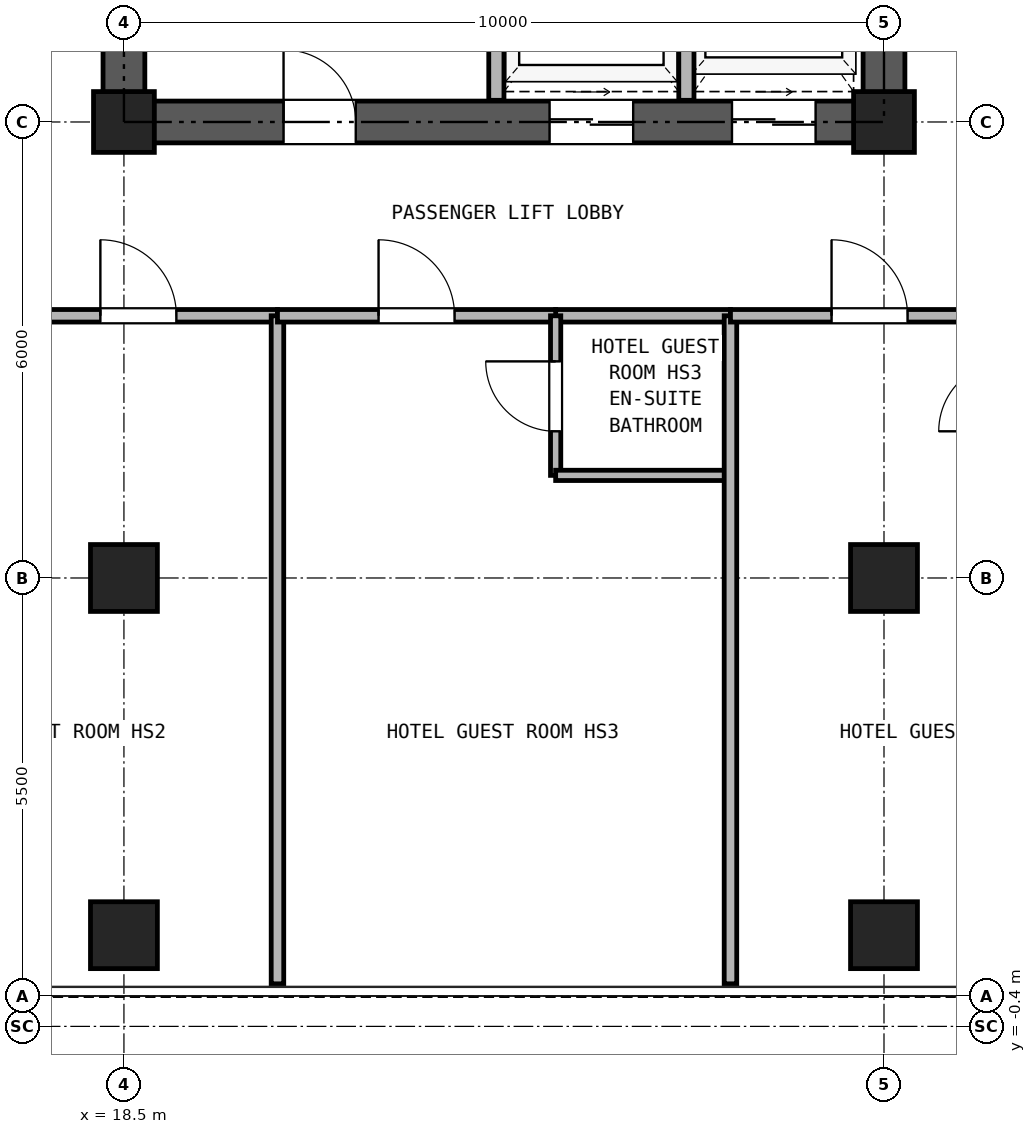
"""IFC4 building model, lengths in metres.
Left out: names, types, materials, properties, quantities, classifications, styles, units other than length and angle.
Written with IfcOpenShell. Run it as: python <this file> out.ifc"""

import sys

from ifc_helpers import new_model, si_unit, direction, frame, frame_2d, origin, origin_2d, place, context, subcontext, project, spatial, rectangle, hollow_rectangle, extrude, source, transform, mapped, element, fill, save


model = new_model("IFC4")
c1 = context("Model", 3, precision=1e-05, world=origin(), true_north=direction((0.0, 1.0)))
c2 = subcontext(c1, "Body", "Model", "MODEL_VIEW")
j1 = project(units=[si_unit("LENGTHUNIT", "METRE"), si_unit("PLANEANGLEUNIT", "RADIAN")], contexts=[c1])
p1 = place(None, origin())
s1 = spatial("IfcSite", under=j1, at=p1, CompositionType="ELEMENT")
p2 = place(p1, origin())
s2 = spatial("IfcBuilding", under=s1, at=p2, CompositionType="ELEMENT")
p3 = place(p2, frame((0.0, 0.0, 111.9)))
s3 = spatial("IfcBuildingStorey", under=s2, at=p3, CompositionType="ELEMENT", Elevation=111.9)
m1 = source(origin(), c2, "Body", "SweptSolid", [
    extrude(hollow_rectangle(XDim=0.88, YDim=0.88, WallThickness=0.05, at=origin_2d()), origin(), (0.0, 0.0, 1.0), 2.95),
])
for number, where, z_axis, x_axis in (
    (1, (18.5, 0.8, 0.0), (0.0, 0.0, 1.0), (1.0, 0.0, 0.0)),
    (2, (28.5, 0.8, 0.0), (0.0, 0.0, 1.0), (1.0, 0.0, 0.0)),
    (3, (18.5, 5.5, 0.0), (0.0, 0.0, 1.0), (1.0, 0.0, 0.0)),
):
    element("IfcColumn", number, at=place(p3, frame(where, z_axis=z_axis, x_axis=x_axis)), inside=s3, PredefinedType="COLUMN", context=c2, shape_type="MappedRepresentation", body=[
        mapped(m1, transform((0.0, 0.0, 0.0), x_axis=(1.0, 0.0, 0.0), y_axis=(0.0, 1.0, 0.0), z_axis=(0.0, 0.0, 1.0), scale=1.0)),
    ])
m2 = source(origin(), c2, "Body", "SweptSolid", [
    extrude(hollow_rectangle(XDim=0.8, YDim=0.8, WallThickness=0.045, at=origin_2d()), origin(), (0.0, 0.0, 1.0), 2.95),
])
p4 = place(p3, frame((18.5, 11.5, 0.0), z_axis=(0.0, 0.0, 1.0), x_axis=(1.0, 0.0, 0.0)))
e4 = element("IfcColumn", 4, at=p4, inside=s3, PredefinedType="COLUMN", context=c2, shape_type="MappedRepresentation", body=[
    mapped(m2, transform((0.0, 0.0, 0.0), x_axis=(1.0, 0.0, 0.0), y_axis=(0.0, 1.0, 0.0), z_axis=(0.0, 0.0, 1.0), scale=1.0)),
])
p5 = place(p3, frame((28.5, 5.5, 0.0), z_axis=(0.0, 0.0, 1.0), x_axis=(1.0, 0.0, 0.0)))
e5 = element("IfcColumn", 5, at=p5, inside=s3, PredefinedType="COLUMN", context=c2, shape_type="MappedRepresentation", body=[
    mapped(m1, transform((0.0, 0.0, 0.0), x_axis=(1.0, 0.0, 0.0), y_axis=(0.0, 1.0, 0.0), z_axis=(0.0, 0.0, 1.0), scale=1.0)),
])
p6 = place(p3, frame((28.5, 11.5, 0.0), z_axis=(0.0, 0.0, 1.0), x_axis=(1.0, 0.0, 0.0)))
e6 = element("IfcColumn", 6, at=p6, inside=s3, PredefinedType="COLUMN", context=c2, shape_type="MappedRepresentation", body=[
    mapped(m2, transform((0.0, 0.0, 0.0), x_axis=(1.0, 0.0, 0.0), y_axis=(0.0, 1.0, 0.0), z_axis=(0.0, 0.0, 1.0), scale=1.0)),
])
p7 = place(p3, frame((18.225, 11.5, 0.0), z_axis=(0.0, 0.0, 1.0), x_axis=(1.0, 0.0, 0.0)))
e7 = element("IfcWall", 7, at=p7, inside=s3, PredefinedType="SHEAR", context=c2, shape_type="SweptSolid", body=[
    extrude(rectangle(XDim=10.55, YDim=0.55, at=frame_2d((5.275, 0.0))), origin(), (0.0, 0.0, 1.0), 2.95),
])
p8 = place(p7, frame((2.375, 0.0, 0.0)))
e8 = element("IfcOpeningElement", 8, at=p8, cuts=e7, PredefinedType="OPENING", context=c2, shape_type="SweptSolid", body=[
    extrude(rectangle(XDim=0.95, YDim=2.15, at=frame_2d((0.475, 1.075))), frame((0.0, 0.285, 0.0), z_axis=(0.0, -1.0, 0.0), x_axis=(1.0, 0.0, 0.0)), (0.0, 0.0, 1.0), 0.57),
])
p9 = place(p7, frame((5.875, 0.0, 0.0)))
e9 = element("IfcOpeningElement", 9, at=p9, cuts=e7, PredefinedType="OPENING", context=c2, shape_type="SweptSolid", body=[
    extrude(rectangle(XDim=1.1, YDim=2.25, at=frame_2d((0.55, 1.125))), frame((0.0, 0.285, 0.0), z_axis=(0.0, -1.0, 0.0), x_axis=(1.0, 0.0, 0.0)), (0.0, 0.0, 1.0), 0.57),
])
p10 = place(p7, frame((8.275, 0.0, 0.0)))
e10 = element("IfcOpeningElement", 10, at=p10, cuts=e7, PredefinedType="OPENING", context=c2, shape_type="SweptSolid", body=[
    extrude(rectangle(XDim=1.1, YDim=2.25, at=frame_2d((0.55, 1.125))), frame((0.0, 0.285, 0.0), z_axis=(0.0, -1.0, 0.0), x_axis=(1.0, 0.0, 0.0)), (0.0, 0.0, 1.0), 0.57),
])
p11 = place(p3, frame((18.5, 11.775, 0.0), z_axis=(0.0, 0.0, 1.0), x_axis=(0.0, 1.0, 0.0)))
e11 = element("IfcWall", 11, at=p11, inside=s3, PredefinedType="SHEAR", context=c2, shape_type="SweptSolid", body=[
    extrude(rectangle(XDim=16.7, YDim=0.55, at=frame_2d((8.35, 0.0))), origin(), (0.0, 0.0, 1.0), 2.95),
])
p12 = place(p11, frame((7.375, 0.0, 0.0)))
e12 = element("IfcOpeningElement", 12, at=p12, cuts=e11, PredefinedType="OPENING", context=c2, shape_type="SweptSolid", body=[
    extrude(rectangle(XDim=1.15, YDim=2.2, at=frame_2d((0.575, 1.1))), frame((0.0, 0.285, 0.0), z_axis=(0.0, -1.0, 0.0), x_axis=(1.0, 0.0, 0.0)), (0.0, 0.0, 1.0), 0.57),
])
p13 = place(p3, frame((28.5, 11.775, 0.0), z_axis=(0.0, 0.0, 1.0), x_axis=(0.0, 1.0, 0.0)))
e13 = element("IfcWall", 13, at=p13, inside=s3, PredefinedType="SHEAR", context=c2, shape_type="SweptSolid", body=[
    extrude(rectangle(XDim=16.7, YDim=0.55, at=frame_2d((8.35, 0.0))), origin(), (0.0, 0.0, 1.0), 2.95),
])
p14 = place(p13, frame((7.375, 0.0, 0.0)))
e14 = element("IfcOpeningElement", 14, at=p14, cuts=e13, PredefinedType="OPENING", context=c2, shape_type="SweptSolid", body=[
    extrude(rectangle(XDim=1.15, YDim=2.2, at=frame_2d((0.575, 1.1))), frame((0.0, 0.285, 0.0), z_axis=(0.0, -1.0, 0.0), x_axis=(1.0, 0.0, 0.0)), (0.0, 0.0, 1.0), 0.57),
])
for number, where, z_axis, x_axis in (
    (15, (23.4, 11.785, 0.0), (0.0, 0.0, 1.0), (0.0, 1.0, 0.0)),
    (16, (25.9, 11.785, 0.0), (0.0, 0.0, 1.0), (0.0, 1.0, 0.0)),
):
    element("IfcWall", number, at=place(p3, frame(where, z_axis=z_axis, x_axis=x_axis)), inside=s3, PredefinedType="PARTITIONING", context=c2, shape_type="SweptSolid", body=[
        extrude(rectangle(XDim=3.215, YDim=0.2, at=frame_2d((1.607, 0.0))), origin(), (0.0, 0.0, 1.0), 2.95),
    ])
p15 = place(p3, frame((16.86, 8.95, 0.0), z_axis=(0.0, 0.0, 1.0), x_axis=(1.0, 0.0, 0.0)))
e17 = element("IfcWall", 17, at=p15, inside=s3, PredefinedType="PARTITIONING", context=c2, shape_type="SweptSolid", body=[
    extrude(rectangle(XDim=3.66, YDim=0.165, at=frame_2d((1.83, 0.0))), origin(), (0.0, 0.0, 1.0), 2.95),
])
p16 = place(p15, frame((1.33, 0.0, 0.0)))
e18 = element("IfcOpeningElement", 18, at=p16, cuts=e17, PredefinedType="OPENING", context=c2, shape_type="SweptSolid", body=[
    extrude(rectangle(XDim=1.0, YDim=2.15, at=frame_2d((0.5, 1.075))), frame((0.0, 0.093, 0.0), z_axis=(0.0, -1.0, 0.0), x_axis=(1.0, 0.0, 0.0)), (0.0, 0.0, 1.0), 0.185),
])
p17 = place(p3, frame((20.52, 0.16, 0.0), z_axis=(0.0, 0.0, 1.0), x_axis=(0.0, 1.0, 0.0)))
e19 = element("IfcWall", 19, at=p17, inside=s3, PredefinedType="PARTITIONING", context=c2, shape_type="SweptSolid", body=[
    extrude(rectangle(XDim=8.79, YDim=0.165, at=frame_2d((4.395, 0.0))), origin(), (0.0, 0.0, 1.0), 2.95),
])
p18 = place(p3, frame((24.18, 8.95, 0.0), z_axis=(0.0, 0.0, 1.0), x_axis=(1.0, 0.0, 0.0)))
e20 = element("IfcWall", 20, at=p18, inside=s3, PredefinedType="PARTITIONING", context=c2, shape_type="SweptSolid", body=[
    extrude(rectangle(XDim=2.3, YDim=0.165, at=frame_2d((1.15, 0.0))), origin(), (0.0, 0.0, 1.0), 2.95),
])
p19 = place(p3, frame((20.52, 8.95, 0.0), z_axis=(0.0, 0.0, 1.0), x_axis=(1.0, 0.0, 0.0)))
e21 = element("IfcWall", 21, at=p19, inside=s3, PredefinedType="PARTITIONING", context=c2, shape_type="SweptSolid", body=[
    extrude(rectangle(XDim=3.66, YDim=0.165, at=frame_2d((1.83, 0.0))), origin(), (0.0, 0.0, 1.0), 2.95),
])
p20 = place(p19, frame((1.33, 0.0, 0.0)))
e22 = element("IfcOpeningElement", 22, at=p20, cuts=e21, PredefinedType="OPENING", context=c2, shape_type="SweptSolid", body=[
    extrude(rectangle(XDim=1.0, YDim=2.15, at=frame_2d((0.5, 1.075))), frame((0.0, 0.093, 0.0), z_axis=(0.0, -1.0, 0.0), x_axis=(1.0, 0.0, 0.0)), (0.0, 0.0, 1.0), 0.185),
])
p21 = place(p3, frame((24.18, 6.85, 0.0), z_axis=(0.0, 0.0, 1.0), x_axis=(0.0, 1.0, 0.0)))
e23 = element("IfcWall", 23, at=p21, inside=s3, PredefinedType="PARTITIONING", context=c2, shape_type="SweptSolid", body=[
    extrude(rectangle(XDim=2.1, YDim=0.135, at=frame_2d((1.05, 0.0))), origin(), (0.0, 0.0, 1.0), 2.95),
])
p22 = place(p21, frame((0.58, 0.0, 0.0)))
e24 = element("IfcOpeningElement", 24, at=p22, cuts=e23, PredefinedType="OPENING", context=c2, shape_type="SweptSolid", body=[
    extrude(rectangle(XDim=0.92, YDim=2.1, at=frame_2d((0.46, 1.05))), frame((0.0, 0.077, 0.0), z_axis=(0.0, -1.0, 0.0), x_axis=(1.0, 0.0, 0.0)), (0.0, 0.0, 1.0), 0.155),
])
p23 = place(p3, frame((24.18, 6.85, 0.0), z_axis=(0.0, 0.0, 1.0), x_axis=(1.0, 0.0, 0.0)))
e25 = element("IfcWall", 25, at=p23, inside=s3, PredefinedType="PARTITIONING", context=c2, shape_type="SweptSolid", body=[
    extrude(rectangle(XDim=2.3, YDim=0.135, at=frame_2d((1.15, 0.0))), origin(), (0.0, 0.0, 1.0), 2.95),
])
p24 = place(p3, frame((26.48, 0.16, 0.0), z_axis=(0.0, 0.0, 1.0), x_axis=(0.0, 1.0, 0.0)))
e26 = element("IfcWall", 26, at=p24, inside=s3, PredefinedType="PARTITIONING", context=c2, shape_type="SweptSolid", body=[
    extrude(rectangle(XDim=8.79, YDim=0.165, at=frame_2d((4.395, 0.0))), origin(), (0.0, 0.0, 1.0), 2.95),
])
p25 = place(p3, frame((26.48, 8.95, 0.0), z_axis=(0.0, 0.0, 1.0), x_axis=(1.0, 0.0, 0.0)))
e27 = element("IfcWall", 27, at=p25, inside=s3, PredefinedType="PARTITIONING", context=c2, shape_type="SweptSolid", body=[
    extrude(rectangle(XDim=3.66, YDim=0.165, at=frame_2d((1.83, 0.0))), origin(), (0.0, 0.0, 1.0), 2.95),
])
p26 = place(p25, frame((1.33, 0.0, 0.0)))
e28 = element("IfcOpeningElement", 28, at=p26, cuts=e27, PredefinedType="OPENING", context=c2, shape_type="SweptSolid", body=[
    extrude(rectangle(XDim=1.0, YDim=2.15, at=frame_2d((0.5, 1.075))), frame((0.0, 0.093, 0.0), z_axis=(0.0, -1.0, 0.0), x_axis=(1.0, 0.0, 0.0)), (0.0, 0.0, 1.0), 0.185),
])
p27 = place(p8, frame((0.95, 0.0, 0.0), z_axis=(0.0, 0.0, 1.0), x_axis=(-1.0, 0.0, 0.0)))
e29 = element("IfcDoor", 29, at=p27, inside=s3, OperationType="SINGLE_SWING_LEFT", PredefinedType="DOOR", context=c2, shape_type="SweptSolid", body=[
    extrude(rectangle(XDim=0.95, YDim=2.15, at=frame_2d((0.475, 1.075))), frame((0.0, 0.025, 0.0), z_axis=(0.0, -1.0, 0.0), x_axis=(1.0, 0.0, 0.0)), (0.0, 0.0, 1.0), 0.05),
])
fill(e8, e29)
p28 = place(p9, frame((1.1, 0.0, 0.0), z_axis=(0.0, 0.0, 1.0), x_axis=(-1.0, 0.0, 0.0)))
e30 = element("IfcDoor", 30, at=p28, inside=s3, OperationType="DOUBLE_DOOR_SLIDING", PredefinedType="DOOR", context=c2, shape_type="SweptSolid", body=[
    extrude(rectangle(XDim=1.1, YDim=2.25, at=frame_2d((0.55, 1.125))), frame((0.0, 0.025, 0.0), z_axis=(0.0, -1.0, 0.0), x_axis=(1.0, 0.0, 0.0)), (0.0, 0.0, 1.0), 0.05),
])
fill(e9, e30)
p29 = place(p10, frame((1.1, 0.0, 0.0), z_axis=(0.0, 0.0, 1.0), x_axis=(-1.0, 0.0, 0.0)))
e31 = element("IfcDoor", 31, at=p29, inside=s3, OperationType="DOUBLE_DOOR_SLIDING", PredefinedType="DOOR", context=c2, shape_type="SweptSolid", body=[
    extrude(rectangle(XDim=1.1, YDim=2.25, at=frame_2d((0.55, 1.125))), frame((0.0, 0.025, 0.0), z_axis=(0.0, -1.0, 0.0), x_axis=(1.0, 0.0, 0.0)), (0.0, 0.0, 1.0), 0.05),
])
fill(e10, e31)
p30 = place(p16, frame((1.0, 0.0, 0.0), z_axis=(0.0, 0.0, 1.0), x_axis=(-1.0, 0.0, 0.0)))
e32 = element("IfcDoor", 32, at=p30, inside=s3, OperationType="SINGLE_SWING_LEFT", PredefinedType="DOOR", context=c2, shape_type="SweptSolid", body=[
    extrude(rectangle(XDim=1.0, YDim=2.15, at=frame_2d((0.5, 1.075))), frame((0.0, 0.025, 0.0), z_axis=(0.0, -1.0, 0.0), x_axis=(1.0, 0.0, 0.0)), (0.0, 0.0, 1.0), 0.05),
])
fill(e18, e32)
p31 = place(p22, origin())
e33 = element("IfcDoor", 33, at=p31, inside=s3, OperationType="SINGLE_SWING_RIGHT", PredefinedType="DOOR", context=c2, shape_type="SweptSolid", body=[
    extrude(rectangle(XDim=0.92, YDim=2.1, at=frame_2d((0.46, 1.05))), frame((0.0, 0.025, 0.0), z_axis=(0.0, -1.0, 0.0), x_axis=(1.0, 0.0, 0.0)), (0.0, 0.0, 1.0), 0.05),
])
fill(e24, e33)
p32 = place(p20, frame((1.0, 0.0, 0.0), z_axis=(0.0, 0.0, 1.0), x_axis=(-1.0, 0.0, 0.0)))
e34 = element("IfcDoor", 34, at=p32, inside=s3, OperationType="SINGLE_SWING_LEFT", PredefinedType="DOOR", context=c2, shape_type="SweptSolid", body=[
    extrude(rectangle(XDim=1.0, YDim=2.15, at=frame_2d((0.5, 1.075))), frame((0.0, 0.025, 0.0), z_axis=(0.0, -1.0, 0.0), x_axis=(1.0, 0.0, 0.0)), (0.0, 0.0, 1.0), 0.05),
])
fill(e22, e34)
p33 = place(p26, frame((1.0, 0.0, 0.0), z_axis=(0.0, 0.0, 1.0), x_axis=(-1.0, 0.0, 0.0)))
e35 = element("IfcDoor", 35, at=p33, inside=s3, OperationType="SINGLE_SWING_LEFT", PredefinedType="DOOR", context=c2, shape_type="SweptSolid", body=[
    extrude(rectangle(XDim=1.0, YDim=2.15, at=frame_2d((0.5, 1.075))), frame((0.0, 0.025, 0.0), z_axis=(0.0, -1.0, 0.0), x_axis=(1.0, 0.0, 0.0)), (0.0, 0.0, 1.0), 0.05),
])
fill(e28, e35)
save(model, sys.argv[1])
